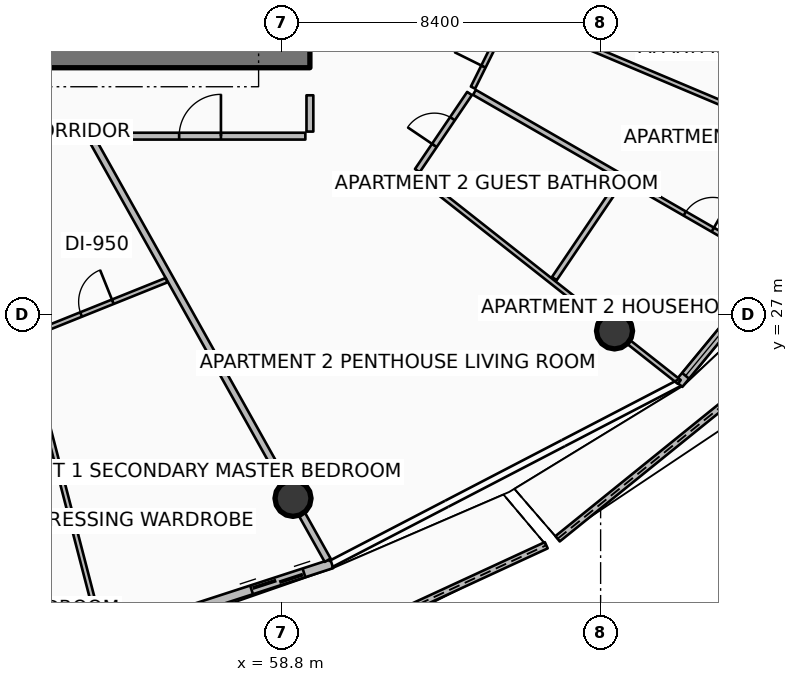
"""IFC4 building model, lengths in metres.
Left out: names, types, materials, properties, quantities, classifications, styles, units other than length and angle.
Written with IfcOpenShell. Run it as: python <this file> out.ifc"""

import sys

from ifc_helpers import new_model, si_unit, direction, frame, frame_2d, origin, origin_2d, place, context, subcontext, project, spatial, polyline, rectangle, circle, outline, extrude, element, fill, save


model = new_model("IFC4")
c1 = context("Model", 3, precision=1e-05, world=origin(), true_north=direction((0.0, 1.0)))
c2 = subcontext(c1, "Body", "Model", "MODEL_VIEW")
j1 = project(units=[si_unit("LENGTHUNIT", "METRE"), si_unit("PLANEANGLEUNIT", "RADIAN")], contexts=[c1])
p1 = place(None, origin())
s1 = spatial("IfcSite", under=j1, at=p1, CompositionType="ELEMENT")
p2 = place(p1, origin())
s2 = spatial("IfcBuilding", under=s1, at=p2, CompositionType="ELEMENT")
p3 = place(p2, frame((0.0, 0.0, 298.3)))
s3 = spatial("IfcBuildingStorey", under=s2, at=p3, CompositionType="ELEMENT", Elevation=298.3)
p4 = place(p3, frame((49.95, 33.75, 0.0), z_axis=(0.0, 0.0, 1.0), x_axis=(1.0, 0.0, 0.0)))
e1 = element("IfcWall", 1, at=p4, inside=s3, PredefinedType="SHEAR", context=c2, shape_type="SweptSolid", body=[
    extrude(rectangle(XDim=9.6, YDim=0.5, at=frame_2d((4.8, 0.0))), origin(), (0.0, 0.0, 1.0), 3.85),
])
for number, where, z_axis, x_axis in (
    (2, (59.105, 22.17, 0.0), (0.0, 0.0, 1.0), (1.0, 0.0, 0.0)),
    (3, (67.566, 26.575, 0.0), (0.0, 0.0, 1.0), (1.0, 0.0, 0.0)),
):
    element("IfcColumn", number, at=place(p3, frame(where, z_axis=z_axis, x_axis=x_axis)), inside=s3, PredefinedType="COLUMN", context=c2, shape_type="SweptSolid", body=[
        extrude(circle(Radius=0.475, at=origin_2d()), origin(), (0.0, 0.0, 1.0), 3.59),
    ])
p5 = place(p3, frame((56.379, 16.598, 0.0), z_axis=(0.0, 0.0, 1.0), x_axis=(0.907848132744, 0.419299138888, 0.0)))
e4 = element("IfcWall", 4, at=p5, inside=s3, PredefinedType="PARAPET", context=c2, shape_type="SweptSolid", body=[
    extrude(outline(polyline([(0.0, 0.0), (10.344, 0.0), (10.344, 1.233), (5.172, 1.418), (0.0, 1.632), (0.0, 0.0)])), frame((0.0, 0.09, 0.0), z_axis=(0.0, -1.0, 0.0), x_axis=(1.0, 0.0, 0.0)), (0.0, 0.0, 1.0), 0.18),
])
p6 = place(p3, frame((66.067, 21.105, 0.0), z_axis=(0.0, 0.0, 1.0), x_axis=(0.777688536298, 0.628649775718, 0.0)))
e5 = element("IfcWall", 5, at=p6, inside=s3, PredefinedType="PARAPET", context=c2, shape_type="SweptSolid", body=[
    extrude(outline(polyline([(0.0, 0.0), (11.285, 0.0), (11.285, 1.148), (5.642, 1.127), (0.0, 1.224), (0.0, 0.0)])), frame((0.0, 0.09, 0.0), z_axis=(0.0, -1.0, 0.0), x_axis=(1.0, 0.0, 0.0)), (0.0, 0.0, 1.0), 0.18),
])
p7 = place(p3, frame((50.858, 17.436, 0.0), z_axis=(0.0, 0.0, 1.0), x_axis=(0.951055974609, 0.309018661507, 0.0)))
e6 = element("IfcWall", 6, at=p7, inside=s3, PredefinedType="SOLIDWALL", context=c2, shape_type="SweptSolid", body=[
    extrude(rectangle(XDim=9.745, YDim=0.24, at=frame_2d((4.873, 0.0))), origin(), (0.0, 0.0, 1.0), 2.54),
])
p8 = place(p7, frame((7.525, 0.0, 0.0)))
e7 = element("IfcOpeningElement", 7, at=p8, cuts=e6, PredefinedType="OPENING", context=c2, shape_type="SweptSolid", body=[
    extrude(rectangle(XDim=1.45, YDim=2.15, at=frame_2d((0.725, 1.075))), frame((0.0, 0.13, 0.0), z_axis=(0.0, -1.0, 0.0), x_axis=(1.0, 0.0, 0.0)), (0.0, 0.0, 1.0), 0.26),
])
p9 = place(p7, frame((0.28, 0.0, 0.65)))
e8 = element("IfcOpeningElement", 8, at=p9, cuts=e6, PredefinedType="OPENING", context=c2, shape_type="SweptSolid", body=[
    extrude(rectangle(XDim=1.6, YDim=1.5, at=frame_2d((0.8, 0.75))), frame((0.0, 0.13, 0.0), z_axis=(0.0, -1.0, 0.0), x_axis=(1.0, 0.0, 0.0)), (0.0, 0.0, 1.0), 0.26),
])
p10 = place(p3, frame((69.258, 25.178, 0.0), z_axis=(0.0, 0.0, 1.0), x_axis=(0.636680093065, 0.771128043255, 0.0)))
e9 = element("IfcWall", 9, at=p10, inside=s3, PredefinedType="SOLIDWALL", context=c2, shape_type="SweptSolid", body=[
    extrude(rectangle(XDim=11.438, YDim=0.24, at=frame_2d((5.719, 0.0))), origin(), (0.0, 0.0, 1.0), 2.54),
])
p11 = place(p10, frame((9.218, 0.0, 0.0)))
e10 = element("IfcOpeningElement", 10, at=p11, cuts=e9, PredefinedType="OPENING", context=c2, shape_type="SweptSolid", body=[
    extrude(rectangle(XDim=1.45, YDim=2.15, at=frame_2d((0.725, 1.075))), frame((0.0, 0.13, 0.0), z_axis=(0.0, -1.0, 0.0), x_axis=(1.0, 0.0, 0.0)), (0.0, 0.0, 1.0), 0.26),
])
p12 = place(p10, frame((0.28, 0.0, 0.65)))
e11 = element("IfcOpeningElement", 11, at=p12, cuts=e9, PredefinedType="OPENING", context=c2, shape_type="SweptSolid", body=[
    extrude(rectangle(XDim=1.6, YDim=1.5, at=frame_2d((0.8, 0.75))), frame((0.0, 0.13, 0.0), z_axis=(0.0, -1.0, 0.0), x_axis=(1.0, 0.0, 0.0)), (0.0, 0.0, 1.0), 0.26),
])
p13 = place(p3, frame((53.822, 31.604, 0.0), z_axis=(0.0, 0.0, 1.0), x_axis=(0.48862858053, -0.872491896976, 0.0)))
e12 = element("IfcWall", 12, at=p13, inside=s3, PredefinedType="PARTITIONING", context=c2, shape_type="SweptSolid", body=[
    extrude(rectangle(XDim=12.679, YDim=0.18, at=frame_2d((6.34, 0.0))), origin(), (0.0, 0.0, 1.0), 2.957),
])
p14 = place(p3, frame((49.339, 31.7, 0.0), z_axis=(0.0, 0.0, 1.0), x_axis=(1.0, 0.0, 0.0)))
e13 = element("IfcWall", 13, at=p14, inside=s3, PredefinedType="PARTITIONING", context=c2, shape_type="SweptSolid", body=[
    extrude(rectangle(XDim=4.309, YDim=0.18, at=frame_2d((2.155, 0.0))), origin(), (0.0, 0.0, 1.0), 2.957),
])
p15 = place(p3, frame((52.065, 26.323, 0.0), z_axis=(0.0, 0.0, 1.0), x_axis=(0.250968538736, -0.967995244082, 0.0)))
e14 = element("IfcWall", 14, at=p15, inside=s3, PredefinedType="PARTITIONING", context=c2, shape_type="SweptSolid", body=[
    extrude(rectangle(XDim=7.968, YDim=0.125, at=frame_2d((3.984, 0.0))), origin(), (0.0, 0.0, 1.0), 3.03),
])
p16 = place(p3, frame((52.116, 26.439, 0.0), z_axis=(0.0, 0.0, 1.0), x_axis=(0.92786943094, 0.372905241486, 0.0)))
e15 = element("IfcWall", 15, at=p16, inside=s3, PredefinedType="PARTITIONING", context=c2, shape_type="SweptSolid", body=[
    extrude(rectangle(XDim=3.945, YDim=0.125, at=frame_2d((1.973, 0.0))), origin(), (0.0, 0.0, 1.0), 2.957),
])
p17 = place(p16, frame((1.523, 0.0, 0.0)))
e16 = element("IfcOpeningElement", 16, at=p17, cuts=e15, PredefinedType="OPENING", context=c2, shape_type="SweptSolid", body=[
    extrude(rectangle(XDim=0.9, YDim=2.08, at=frame_2d((0.45, 1.04))), frame((0.0, 0.073, 0.0), z_axis=(0.0, -1.0, 0.0), x_axis=(1.0, 0.0, 0.0)), (0.0, 0.0, 1.0), 0.145),
])
p18 = place(p3, frame((53.888, 31.7, 0.0), z_axis=(0.0, 0.0, 1.0), x_axis=(1.0, 0.0, 0.0)))
e17 = element("IfcWall", 17, at=p18, inside=s3, PredefinedType="PARTITIONING", context=c2, shape_type="SweptSolid", body=[
    extrude(rectangle(XDim=5.542, YDim=0.18, at=frame_2d((2.771, 0.0))), origin(), (0.0, 0.0, 1.0), 2.957),
])
p19 = place(p18, frame((2.221, 0.0, 0.0)))
e18 = element("IfcOpeningElement", 18, at=p19, cuts=e17, PredefinedType="OPENING", context=c2, shape_type="SweptSolid", body=[
    extrude(rectangle(XDim=1.1, YDim=2.1, at=frame_2d((0.55, 1.05))), frame((0.0, 0.1, 0.0), z_axis=(0.0, -1.0, 0.0), x_axis=(1.0, 0.0, 0.0)), (0.0, 0.0, 1.0), 0.2),
])
p20 = place(p3, frame((59.55, 31.82, 0.0), z_axis=(0.0, 0.0, 1.0), x_axis=(0.0, 1.0, 0.0)))
e19 = element("IfcWall", 19, at=p20, inside=s3, PredefinedType="PARTITIONING", context=c2, shape_type="SweptSolid", body=[
    extrude(rectangle(XDim=0.955, YDim=0.18, at=frame_2d((0.477, 0.0))), origin(), (0.0, 0.0, 1.0), 2.957),
])
p21 = place(p3, frame((62.399, 30.648, 0.0), z_axis=(0.0, 0.0, 1.0), x_axis=(0.785335435896, -0.619070475088, 0.0)))
e20 = element("IfcWall", 20, at=p21, inside=s3, PredefinedType="PARTITIONING", context=c2, shape_type="SweptSolid", body=[
    extrude(rectangle(XDim=8.749, YDim=0.125, at=frame_2d((4.374, 0.0))), origin(), (0.0, 0.0, 1.0), 2.957),
])
p22 = place(p3, frame((62.377, 30.793, 0.0), z_axis=(0.0, 0.0, 1.0), x_axis=(0.560572719222, 0.828105202534, 0.0)))
e21 = element("IfcWall", 21, at=p22, inside=s3, PredefinedType="PARTITIONING", context=c2, shape_type="SweptSolid", body=[
    extrude(rectangle(XDim=2.45, YDim=0.15, at=frame_2d((1.225, 0.0))), origin(), (0.0, 0.0, 1.0), 2.957),
])
p23 = place(p22, frame((0.8, 0.0, 0.0)))
e22 = element("IfcOpeningElement", 22, at=p23, cuts=e21, PredefinedType="OPENING", context=c2, shape_type="SweptSolid", body=[
    extrude(rectangle(XDim=0.85, YDim=2.06, at=frame_2d((0.425, 1.03))), frame((0.0, 0.085, 0.0), z_axis=(0.0, -1.0, 0.0), x_axis=(1.0, 0.0, 0.0)), (0.0, 0.0, 1.0), 0.17),
])
p24 = place(p3, frame((65.982, 27.951, 0.0), z_axis=(0.0, 0.0, 1.0), x_axis=(0.560619338422, 0.82807364249, 0.0)))
e23 = element("IfcWall", 23, at=p24, inside=s3, PredefinedType="PARTITIONING", context=c2, shape_type="SweptSolid", body=[
    extrude(rectangle(XDim=3.115, YDim=0.15, at=frame_2d((1.557, 0.0))), origin(), (0.0, 0.0, 1.0), 2.957),
])
p25 = place(p3, frame((63.879, 32.852, 0.0), z_axis=(0.0, 0.0, 1.0), x_axis=(0.866472506867, -0.499224793899, 0.0)))
e24 = element("IfcWall", 24, at=p25, inside=s3, PredefinedType="PARTITIONING", context=c2, shape_type="SweptSolid", body=[
    extrude(rectangle(XDim=4.46, YDim=0.15, at=frame_2d((2.23, 0.0))), origin(), (0.0, 0.0, 1.0), 3.03),
])
p26 = place(p3, frame((67.856, 30.56, 0.0), z_axis=(0.0, 0.0, 1.0), x_axis=(0.86648068721, -0.499210595533, 0.0)))
e25 = element("IfcWall", 25, at=p26, inside=s3, PredefinedType="PARTITIONING", context=c2, shape_type="SweptSolid", body=[
    extrude(rectangle(XDim=4.447, YDim=0.125, at=frame_2d((2.223, 0.0))), origin(), (0.0, 0.0, 1.0), 3.03),
])
p27 = place(p26, frame((1.798, 0.0, 0.0)))
e26 = element("IfcOpeningElement", 26, at=p27, cuts=e25, PredefinedType="OPENING", context=c2, shape_type="SweptSolid", body=[
    extrude(rectangle(XDim=0.85, YDim=2.06, at=frame_2d((0.425, 1.03))), frame((0.0, 0.073, 0.0), z_axis=(0.0, -1.0, 0.0), x_axis=(1.0, 0.0, 0.0)), (0.0, 0.0, 1.0), 0.145),
])
p28 = place(p3, frame((64.888, 34.884, 0.0), z_axis=(0.0, 0.0, 1.0), x_axis=(0.921531711532, -0.388303109235, 0.0)))
e27 = element("IfcWall", 27, at=p28, inside=s3, PredefinedType="PARTITIONING", context=c2, shape_type="SweptSolid", body=[
    extrude(rectangle(XDim=9.845, YDim=0.125, at=frame_2d((4.922, 0.0))), origin(), (0.0, 0.0, 1.0), 3.03),
])
p29 = place(p3, frame((63.841, 32.977, 0.0), z_axis=(0.0, 0.0, 1.0), x_axis=(0.444545737729, 0.895756153798, 0.0)))
e28 = element("IfcWall", 28, at=p29, inside=s3, PredefinedType="PARTITIONING", context=c2, shape_type="SweptSolid", body=[
    extrude(rectangle(XDim=2.088, YDim=0.125, at=frame_2d((1.044, 0.0))), origin(), (0.0, 0.0, 1.0), 3.03),
])
p30 = place(p29, frame((0.619, 0.0, 0.0)))
e29 = element("IfcOpeningElement", 29, at=p30, cuts=e28, PredefinedType="OPENING", context=c2, shape_type="SweptSolid", body=[
    extrude(rectangle(XDim=0.85, YDim=2.06, at=frame_2d((0.425, 1.03))), frame((0.0, 0.073, 0.0), z_axis=(0.0, -1.0, 0.0), x_axis=(1.0, 0.0, 0.0)), (0.0, 0.0, 1.0), 0.145),
])
p31 = place(p8, origin())
e30 = element("IfcDoor", 30, at=p31, inside=s3, OperationType="DOUBLE_DOOR_SLIDING", PredefinedType="DOOR", context=c2, shape_type="SweptSolid", body=[
    extrude(rectangle(XDim=1.45, YDim=2.15, at=frame_2d((0.725, 1.075))), frame((0.0, 0.025, 0.0), z_axis=(0.0, -1.0, 0.0), x_axis=(1.0, 0.0, 0.0)), (0.0, 0.0, 1.0), 0.05),
])
fill(e7, e30)
p32 = place(p12, origin())
e31 = element("IfcWindow", 31, at=p32, inside=s3, PartitioningType="SINGLE_PANEL", PredefinedType="WINDOW", context=c2, shape_type="SweptSolid", body=[
    extrude(rectangle(XDim=1.6, YDim=1.5, at=frame_2d((0.8, 0.75))), frame((0.0, 0.03, 0.0), z_axis=(0.0, -1.0, 0.0), x_axis=(1.0, 0.0, 0.0)), (0.0, 0.0, 1.0), 0.06),
])
fill(e11, e31)
p33 = place(p17, origin())
e32 = element("IfcDoor", 32, at=p33, inside=s3, OperationType="SINGLE_SWING_RIGHT", PredefinedType="DOOR", context=c2, shape_type="SweptSolid", body=[
    extrude(rectangle(XDim=0.9, YDim=2.08, at=frame_2d((0.45, 1.04))), frame((0.0, 0.025, 0.0), z_axis=(0.0, -1.0, 0.0), x_axis=(1.0, 0.0, 0.0)), (0.0, 0.0, 1.0), 0.05),
])
fill(e16, e32)
p34 = place(p19, origin())
e33 = element("IfcDoor", 33, at=p34, inside=s3, OperationType="SINGLE_SWING_RIGHT", PredefinedType="DOOR", context=c2, shape_type="SweptSolid", body=[
    extrude(rectangle(XDim=1.1, YDim=2.1, at=frame_2d((0.55, 1.05))), frame((0.0, 0.025, 0.0), z_axis=(0.0, -1.0, 0.0), x_axis=(1.0, 0.0, 0.0)), (0.0, 0.0, 1.0), 0.05),
])
fill(e18, e33)
p35 = place(p23, origin())
e34 = element("IfcDoor", 34, at=p35, inside=s3, OperationType="SINGLE_SWING_LEFT", PredefinedType="DOOR", context=c2, shape_type="SweptSolid", body=[
    extrude(rectangle(XDim=0.85, YDim=2.06, at=frame_2d((0.425, 1.03))), frame((0.0, 0.025, 0.0), z_axis=(0.0, -1.0, 0.0), x_axis=(1.0, 0.0, 0.0)), (0.0, 0.0, 1.0), 0.05),
])
fill(e22, e34)
p36 = place(p27, origin())
e35 = element("IfcDoor", 35, at=p36, inside=s3, OperationType="SINGLE_SWING_RIGHT", PredefinedType="DOOR", context=c2, shape_type="SweptSolid", body=[
    extrude(rectangle(XDim=0.85, YDim=2.06, at=frame_2d((0.425, 1.03))), frame((0.0, 0.025, 0.0), z_axis=(0.0, -1.0, 0.0), x_axis=(1.0, 0.0, 0.0)), (0.0, 0.0, 1.0), 0.05),
])
fill(e26, e35)
p37 = place(p30, origin())
e36 = element("IfcDoor", 36, at=p37, inside=s3, OperationType="SINGLE_SWING_LEFT", PredefinedType="DOOR", context=c2, shape_type="SweptSolid", body=[
    extrude(rectangle(XDim=0.85, YDim=2.06, at=frame_2d((0.425, 1.03))), frame((0.0, 0.025, 0.0), z_axis=(0.0, -1.0, 0.0), x_axis=(1.0, 0.0, 0.0)), (0.0, 0.0, 1.0), 0.05),
])
fill(e29, e36)
save(model, sys.argv[1])
